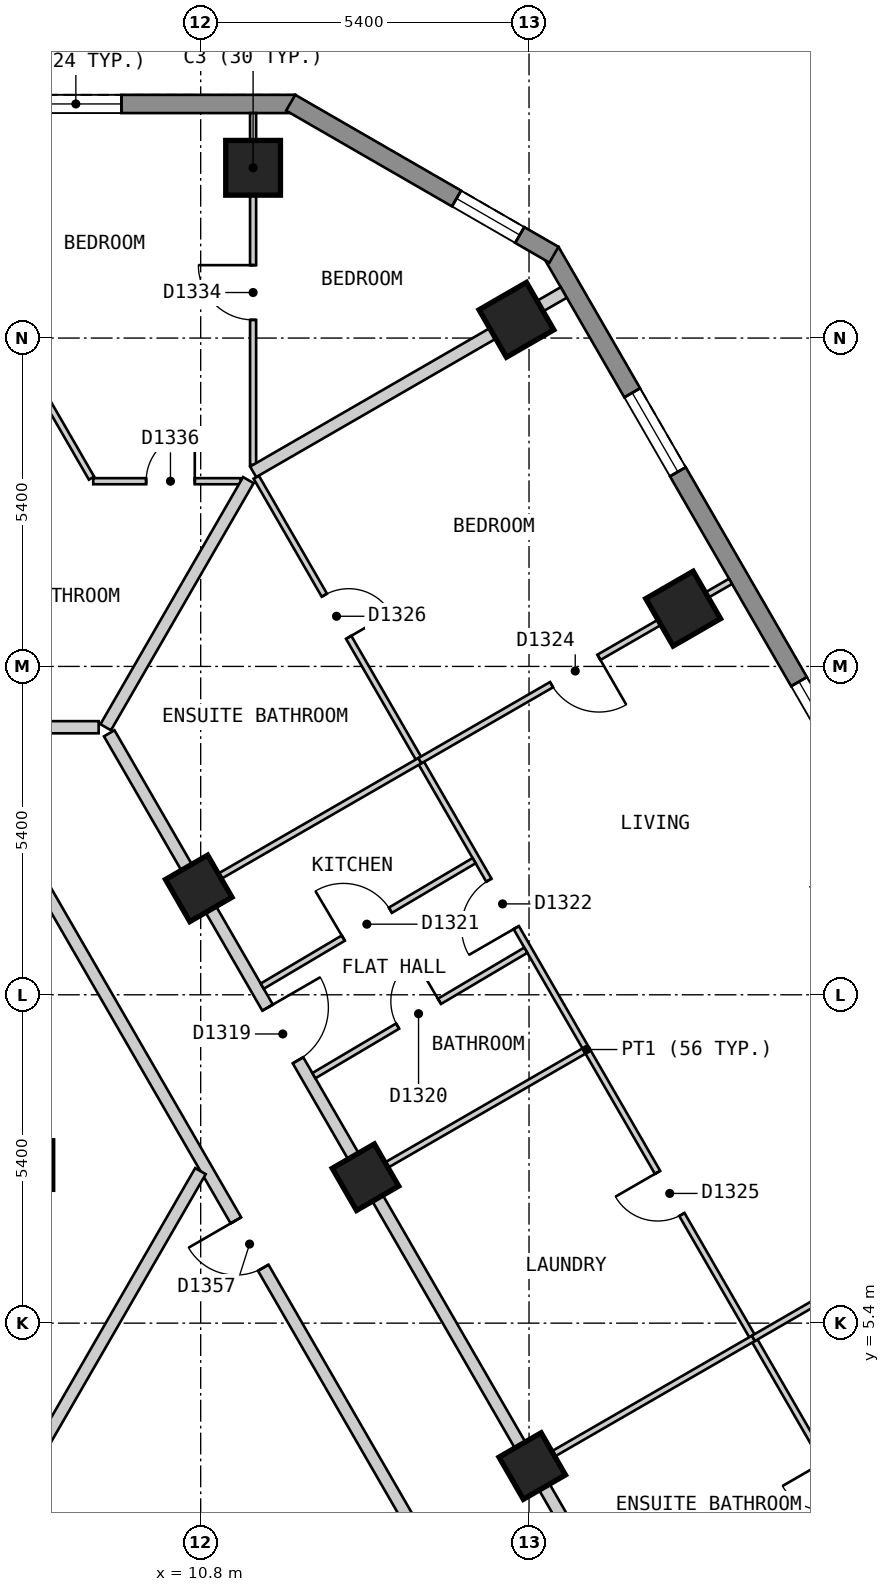
"""IFC4 building model, lengths in metres.
Left out: names, types, materials, properties, quantities, classifications, styles, units other than length and angle.
Written with IfcOpenShell. Run it as: python <this file> out.ifc"""

import sys

from ifc_helpers import new_model, si_unit, direction, frame, frame_2d, origin, origin_2d, place, context, subcontext, project, spatial, polyline, rectangle, outline, extrude, element, fill, save


model = new_model("IFC4")
c1 = context("Model", 3, precision=1e-05, world=origin(), true_north=direction((0.0, 1.0)))
c2 = subcontext(c1, "Body", "Model", "MODEL_VIEW")
j1 = project(units=[si_unit("LENGTHUNIT", "METRE"), si_unit("PLANEANGLEUNIT", "RADIAN")], contexts=[c1])
p1 = place(None, origin())
s1 = spatial("IfcSite", under=j1, at=p1, CompositionType="ELEMENT")
p2 = place(p1, origin())
s2 = spatial("IfcBuilding", under=s1, at=p2, CompositionType="ELEMENT")
p3 = place(p2, frame((0.0, 0.0, 135.6)))
s3 = spatial("IfcBuildingStorey", under=s2, at=p3, CompositionType="ELEMENT", Elevation=135.6)
for number, where, z_axis, x_axis in (
    (1, (11.662, 24.4, 0.0), (0.0, 0.0, 1.0), (-1.0, 0.0, 0.0)),
    (2, (18.735, 17.15, 0.0), (0.0, 0.0, 1.0), (-0.5, 0.866, 0.0)),
    (3, (15.993, 21.9, 0.0), (0.0, 0.0, 1.0), (-0.5, 0.866, 0.0)),
):
    element("IfcColumn", number, at=place(p3, frame(where, z_axis=z_axis, x_axis=x_axis)), inside=s3, PredefinedType="COLUMN", context=c2, shape_type="SweptSolid", body=[
        extrude(rectangle(XDim=0.9, YDim=0.9, at=origin_2d()), origin(), (0.0, 0.0, 1.0), 3.0),
    ])
for number, where, z_axis, x_axis in (
    (4, (16.253, 3.05, 0.0), (0.0, 0.0, 1.0), (-0.5, 0.866, 0.0)),
    (5, (13.51, 7.8, 0.0), (0.0, 0.0, 1.0), (-0.5, 0.866, 0.0)),
    (6, (7.967, 8.0, 0.0), (0.0, 0.0, 1.0), (1.0, 0.0, 0.0)),
    (7, (10.768, 12.55, 0.0), (0.0, 0.0, 1.0), (-0.5, 0.866, 0.0)),
):
    element("IfcColumn", number, at=place(p3, frame(where, z_axis=z_axis, x_axis=x_axis)), inside=s3, PredefinedType="COLUMN", context=c2, shape_type="SweptSolid", body=[
        extrude(rectangle(XDim=0.8, YDim=0.8, at=origin_2d()), origin(), (0.0, 0.0, 1.0), 3.0),
    ])
p4 = place(p3, frame((12.355, 25.45, 0.0), z_axis=(0.0, 0.0, 1.0), x_axis=(-1.0, 0.0, 0.0)))
e8 = element("IfcWall", 8, at=p4, inside=s3, PredefinedType="SOLIDWALL", context=c2, shape_type="SweptSolid", body=[
    extrude(outline(polyline([(0.0, -0.15), (24.71, -0.15), (24.63, 0.15), (0.08, 0.15), (0.0, -0.15)])), origin(), (0.0, 0.0, 1.0), 2.7),
])
p5 = place(p4, frame((2.858, 0.0, 0.15)))
e9 = element("IfcOpeningElement", 9, at=p5, cuts=e8, PredefinedType="OPENING", context=c2, shape_type="SweptSolid", body=[
    extrude(rectangle(XDim=1.5, YDim=2.1, at=frame_2d((0.75, 1.05))), frame((0.0, 0.16, 0.0), z_axis=(0.0, -1.0, 0.0), x_axis=(1.0, 0.0, 0.0)), (0.0, 0.0, 1.0), 0.32),
])
p6 = place(p4, frame((8.689, 0.0, 0.15)))
e10 = element("IfcOpeningElement", 10, at=p6, cuts=e8, PredefinedType="OPENING", context=c2, shape_type="SweptSolid", body=[
    extrude(rectangle(XDim=1.5, YDim=2.1, at=frame_2d((0.75, 1.05))), frame((0.0, 0.16, 0.0), z_axis=(0.0, -1.0, 0.0), x_axis=(1.0, 0.0, 0.0)), (0.0, 0.0, 1.0), 0.32),
])
p7 = place(p4, frame((14.521, 0.0, 0.15)))
e11 = element("IfcOpeningElement", 11, at=p7, cuts=e8, PredefinedType="OPENING", context=c2, shape_type="SweptSolid", body=[
    extrude(rectangle(XDim=1.5, YDim=2.1, at=frame_2d((0.75, 1.05))), frame((0.0, 0.16, 0.0), z_axis=(0.0, -1.0, 0.0), x_axis=(1.0, 0.0, 0.0)), (0.0, 0.0, 1.0), 0.32),
])
p8 = place(p4, frame((20.352, 0.0, 0.15)))
e12 = element("IfcOpeningElement", 12, at=p8, cuts=e8, PredefinedType="OPENING", context=c2, shape_type="SweptSolid", body=[
    extrude(rectangle(XDim=1.5, YDim=2.1, at=frame_2d((0.75, 1.05))), frame((0.0, 0.16, 0.0), z_axis=(0.0, -1.0, 0.0), x_axis=(1.0, 0.0, 0.0)), (0.0, 0.0, 1.0), 0.32),
])
p9 = place(p3, frame((28.218, 2.825, 0.0), z_axis=(0.0, 0.0, 1.0), x_axis=(-0.500020536353, 0.866013546791, 0.0)))
e13 = element("IfcWall", 13, at=p9, inside=s3, PredefinedType="SOLIDWALL", context=c2, shape_type="SweptSolid", body=[
    extrude(outline(polyline([(0.0, -0.15), (23.325, -0.15), (23.245, 0.15), (0.08, 0.15), (0.0, -0.15)])), origin(), (0.0, 0.0, 1.0), 2.7),
])
p10 = place(p9, frame((2.685, 0.0, 0.15)))
e14 = element("IfcOpeningElement", 14, at=p10, cuts=e13, PredefinedType="OPENING", context=c2, shape_type="SweptSolid", body=[
    extrude(rectangle(XDim=1.5, YDim=2.1, at=frame_2d((0.75, 1.05))), frame((0.0, 0.16, 0.0), z_axis=(0.0, -1.0, 0.0), x_axis=(1.0, 0.0, 0.0)), (0.0, 0.0, 1.0), 0.32),
])
p11 = place(p9, frame((8.17, 0.0, 0.15)))
e15 = element("IfcOpeningElement", 15, at=p11, cuts=e13, PredefinedType="OPENING", context=c2, shape_type="SweptSolid", body=[
    extrude(rectangle(XDim=1.5, YDim=2.1, at=frame_2d((0.75, 1.05))), frame((0.0, 0.16, 0.0), z_axis=(0.0, -1.0, 0.0), x_axis=(1.0, 0.0, 0.0)), (0.0, 0.0, 1.0), 0.32),
])
p12 = place(p9, frame((13.655, 0.0, 0.15)))
e16 = element("IfcOpeningElement", 16, at=p12, cuts=e13, PredefinedType="OPENING", context=c2, shape_type="SweptSolid", body=[
    extrude(rectangle(XDim=1.5, YDim=2.1, at=frame_2d((0.75, 1.05))), frame((0.0, 0.16, 0.0), z_axis=(0.0, -1.0, 0.0), x_axis=(1.0, 0.0, 0.0)), (0.0, 0.0, 1.0), 0.32),
])
p13 = place(p9, frame((19.14, 0.0, 0.15)))
e17 = element("IfcOpeningElement", 17, at=p13, cuts=e13, PredefinedType="OPENING", context=c2, shape_type="SweptSolid", body=[
    extrude(rectangle(XDim=1.5, YDim=2.1, at=frame_2d((0.75, 1.05))), frame((0.0, 0.16, 0.0), z_axis=(0.0, -1.0, 0.0), x_axis=(1.0, 0.0, 0.0)), (0.0, 0.0, 1.0), 0.32),
])
p14 = place(p3, frame((16.61, 22.97, 0.0), z_axis=(0.0, 0.0, 1.0), x_axis=(-0.866022959057, 0.500004234368, 0.0)))
e18 = element("IfcWall", 18, at=p14, inside=s3, PredefinedType="SOLIDWALL", context=c2, shape_type="SweptSolid", body=[
    extrude(outline(polyline([(0.0, -0.15), (5.0, -0.15), (4.92, 0.15), (0.08, 0.15), (0.0, -0.15)])), origin(), (0.0, 0.0, 1.0), 2.7),
])
p15 = place(p14, frame((0.65, 0.0, 0.15)))
e19 = element("IfcOpeningElement", 19, at=p15, cuts=e18, PredefinedType="OPENING", context=c2, shape_type="SweptSolid", body=[
    extrude(rectangle(XDim=1.2, YDim=2.1, at=frame_2d((0.6, 1.05))), frame((0.0, 0.16, 0.0), z_axis=(0.0, -1.0, 0.0), x_axis=(1.0, 0.0, 0.0)), (0.0, 0.0, 1.0), 0.32),
])
p16 = place(p3, frame((7.967, 13.0, 0.0), z_axis=(0.0, 0.0, 1.0), x_axis=(0.50003774998, -0.866003607726, 0.0)))
e20 = element("IfcWall", 20, at=p16, inside=s3, PredefinedType="PARTITIONING", context=c2, shape_type="SweptSolid", body=[
    extrude(rectangle(XDim=14.433, YDim=0.2, at=frame_2d((7.217, 0.0))), origin(), (0.0, 0.0, 1.0), 2.7),
])
p17 = place(p16, frame((6.824, 0.0, 0.0)))
e21 = element("IfcOpeningElement", 21, at=p17, cuts=e20, PredefinedType="OPENING", context=c2, shape_type="SweptSolid", body=[
    extrude(rectangle(XDim=0.9, YDim=2.1, at=frame_2d((0.45, 1.05))), frame((0.0, 0.11, 0.0), z_axis=(0.0, -1.0, 0.0), x_axis=(1.0, 0.0, 0.0)), (0.0, 0.0, 1.0), 0.22),
])
p18 = place(p3, frame((9.296, 15.1, 0.0), z_axis=(0.0, 0.0, 1.0), x_axis=(0.499974024244, -0.866040400375, 0.0)))
e22 = element("IfcWall", 22, at=p18, inside=s3, PredefinedType="PARTITIONING", context=c2, shape_type="SweptSolid", body=[
    extrude(rectangle(XDim=16.857, YDim=0.2, at=frame_2d((8.429, 0.0))), origin(), (0.0, 0.0, 1.0), 2.7),
])
p19 = place(p18, frame((5.209, 0.0, 0.0)))
e23 = element("IfcOpeningElement", 23, at=p19, cuts=e22, PredefinedType="OPENING", context=c2, shape_type="SweptSolid", body=[
    extrude(rectangle(XDim=1.0, YDim=2.1, at=frame_2d((0.5, 1.05))), frame((0.0, 0.11, 0.0), z_axis=(0.0, -1.0, 0.0), x_axis=(1.0, 0.0, 0.0)), (0.0, 0.0, 1.0), 0.22),
])
p20 = place(p3, frame((6.697, 15.2, 0.0), z_axis=(0.0, 0.0, 1.0), x_axis=(1.0, 0.0, 0.0)))
e24 = element("IfcWall", 24, at=p20, inside=s3, PredefinedType="PARTITIONING", context=c2, shape_type="SweptSolid", body=[
    extrude(rectangle(XDim=2.425, YDim=0.2, at=frame_2d((1.212, 0.0))), origin(), (0.0, 0.0, 1.0), 2.7),
])
p21 = place(p3, frame((7.028, 1.373, 0.0), z_axis=(0.0, 0.0, 1.0), x_axis=(0.499954271211, 0.866051803703, 0.0)))
e25 = element("IfcWall", 25, at=p21, inside=s3, PredefinedType="PARTITIONING", context=c2, shape_type="SweptSolid", body=[
    extrude(rectangle(XDim=7.536, YDim=0.2, at=frame_2d((3.768, 0.0))), origin(), (0.0, 0.0, 1.0), 2.7),
])
p22 = place(p3, frame((7.792, 21.396, 0.0), z_axis=(0.0, 0.0, 1.0), x_axis=(0.50012328804, -0.865954211699, 0.0)))
e26 = element("IfcWall", 26, at=p22, inside=s3, PredefinedType="PARTITIONING", context=c2, shape_type="SweptSolid", body=[
    extrude(rectangle(XDim=2.425, YDim=0.1, at=frame_2d((1.213, 0.0))), origin(), (0.0, 0.0, 1.0), 2.7),
])
p23 = place(p3, frame((11.713, 19.313, 0.0), z_axis=(0.0, 0.0, 1.0), x_axis=(0.499999523185, -0.866025679073, 0.0)))
e27 = element("IfcWall", 27, at=p23, inside=s3, PredefinedType="PARTITIONING", context=c2, shape_type="SweptSolid", body=[
    extrude(rectangle(XDim=21.738, YDim=0.1, at=frame_2d((10.869, 0.0))), origin(), (0.0, 0.0, 1.0), 2.7),
])
p24 = place(p23, frame((7.654, 0.0, 0.0)))
e28 = element("IfcOpeningElement", 28, at=p24, cuts=e27, PredefinedType="OPENING", context=c2, shape_type="SweptSolid", body=[
    extrude(rectangle(XDim=0.9, YDim=2.1, at=frame_2d((0.45, 1.05))), frame((0.0, 0.06, 0.0), z_axis=(0.0, -1.0, 0.0), x_axis=(1.0, 0.0, 0.0)), (0.0, 0.0, 1.0), 0.12),
])
p25 = place(p23, frame((13.202, 0.0, 0.0)))
e29 = element("IfcOpeningElement", 29, at=p25, cuts=e27, PredefinedType="OPENING", context=c2, shape_type="SweptSolid", body=[
    extrude(rectangle(XDim=0.8, YDim=2.1, at=frame_2d((0.4, 1.05))), frame((0.0, 0.06, 0.0), z_axis=(0.0, -1.0, 0.0), x_axis=(1.0, 0.0, 0.0)), (0.0, 0.0, 1.0), 0.12),
])
p26 = place(p23, frame((2.242, 0.0, 0.0)))
e30 = element("IfcOpeningElement", 30, at=p26, cuts=e27, PredefinedType="OPENING", context=c2, shape_type="SweptSolid", body=[
    extrude(rectangle(XDim=0.8, YDim=2.1, at=frame_2d((0.4, 1.05))), frame((0.0, 0.06, 0.0), z_axis=(0.0, -1.0, 0.0), x_axis=(1.0, 0.0, 0.0)), (0.0, 0.0, 1.0), 0.12),
])
p27 = place(p23, frame((18.696, 0.0, 0.0)))
e31 = element("IfcOpeningElement", 31, at=p27, cuts=e27, PredefinedType="OPENING", context=c2, shape_type="SweptSolid", body=[
    extrude(rectangle(XDim=0.8, YDim=2.1, at=frame_2d((0.4, 1.05))), frame((0.0, 0.06, 0.0), z_axis=(0.0, -1.0, 0.0), x_axis=(1.0, 0.0, 0.0)), (0.0, 0.0, 1.0), 0.12),
])
p28 = place(p3, frame((9.033, 19.246, 0.0), z_axis=(0.0, 0.0, 1.0), x_axis=(1.0, 0.0, 0.0)))
e32 = element("IfcWall", 32, at=p28, inside=s3, PredefinedType="PARTITIONING", context=c2, shape_type="SweptSolid", body=[
    extrude(rectangle(XDim=2.425, YDim=0.1, at=frame_2d((1.212, 0.0))), origin(), (0.0, 0.0, 1.0), 2.7),
])
p29 = place(p28, frame((0.87, 0.0, 0.0)))
e33 = element("IfcOpeningElement", 33, at=p29, cuts=e32, PredefinedType="OPENING", context=c2, shape_type="SweptSolid", body=[
    extrude(rectangle(XDim=0.8, YDim=2.1, at=frame_2d((0.4, 1.05))), frame((0.0, 0.06, 0.0), z_axis=(0.0, -1.0, 0.0), x_axis=(1.0, 0.0, 0.0)), (0.0, 0.0, 1.0), 0.12),
])
p30 = place(p3, frame((11.662, 19.514, 0.0), z_axis=(0.0, 0.0, 1.0), x_axis=(0.0, 1.0, 0.0)))
e34 = element("IfcWall", 34, at=p30, inside=s3, PredefinedType="PARTITIONING", context=c2, shape_type="SweptSolid", body=[
    extrude(rectangle(XDim=5.786, YDim=0.1, at=frame_2d((2.893, 0.0))), origin(), (0.0, 0.0, 1.0), 2.7),
])
p31 = place(p30, frame((2.385, 0.0, 0.0)))
e35 = element("IfcOpeningElement", 35, at=p31, cuts=e34, PredefinedType="OPENING", context=c2, shape_type="SweptSolid", body=[
    extrude(rectangle(XDim=0.9, YDim=2.1, at=frame_2d((0.45, 1.05))), frame((0.0, 0.06, 0.0), z_axis=(0.0, -1.0, 0.0), x_axis=(1.0, 0.0, 0.0)), (0.0, 0.0, 1.0), 0.12),
])
p32 = place(p3, frame((16.339, 3.1, 0.0), z_axis=(0.0, 0.0, 1.0), x_axis=(0.866050731258, 0.499956128963, 0.0)))
e36 = element("IfcWall", 36, at=p32, inside=s3, PredefinedType="PARTITIONING", context=c2, shape_type="SweptSolid", body=[
    extrude(rectangle(XDim=4.1, YDim=0.1, at=frame_2d((2.05, 0.0))), origin(), (0.0, 0.0, 1.0), 2.7),
])
p33 = place(p3, frame((13.597, 7.85, 0.0), z_axis=(0.0, 0.0, 1.0), x_axis=(0.866015917575, 0.500016430238, 0.0)))
e37 = element("IfcWall", 37, at=p33, inside=s3, PredefinedType="PARTITIONING", context=c2, shape_type="SweptSolid", body=[
    extrude(rectangle(XDim=4.05, YDim=0.1, at=frame_2d((2.025, 0.0))), origin(), (0.0, 0.0, 1.0), 2.7),
])
p34 = place(p3, frame((10.854, 12.6, 0.0), z_axis=(0.0, 0.0, 1.0), x_axis=(0.86606561423, 0.499930346997, 0.0)))
e38 = element("IfcWall", 38, at=p34, inside=s3, PredefinedType="PARTITIONING", context=c2, shape_type="SweptSolid", body=[
    extrude(rectangle(XDim=4.1, YDim=0.1, at=frame_2d((2.05, 0.0))), origin(), (0.0, 0.0, 1.0), 2.7),
])
p35 = place(p3, frame((11.812, 10.942, 0.0), z_axis=(0.0, 0.0, 1.0), x_axis=(0.860404104761, 0.509612378687, 0.0)))
e39 = element("IfcWall", 39, at=p35, inside=s3, PredefinedType="PARTITIONING", context=c2, shape_type="SweptSolid", body=[
    extrude(rectangle(XDim=4.051, YDim=0.1, at=frame_2d((2.025, 0.0))), origin(), (0.0, 0.0, 1.0), 2.7),
])
p36 = place(p35, frame((1.55, 0.0, 0.0)))
e40 = element("IfcOpeningElement", 40, at=p36, cuts=e39, PredefinedType="OPENING", context=c2, shape_type="SweptSolid", body=[
    extrude(rectangle(XDim=0.9, YDim=2.1, at=frame_2d((0.45, 1.05))), frame((0.0, 0.06, 0.0), z_axis=(0.0, -1.0, 0.0), x_axis=(1.0, 0.0, 0.0)), (0.0, 0.0, 1.0), 0.12),
])
p37 = place(p3, frame((12.662, 9.47, 0.0), z_axis=(0.0, 0.0, 1.0), x_axis=(0.860520594262, 0.509415652341, 0.0)))
e41 = element("IfcWall", 41, at=p37, inside=s3, PredefinedType="PARTITIONING", context=c2, shape_type="SweptSolid", body=[
    extrude(rectangle(XDim=4.05, YDim=0.1, at=frame_2d((2.025, 0.0))), origin(), (0.0, 0.0, 1.0), 2.7),
])
p38 = place(p37, frame((1.6, 0.0, 0.0)))
e42 = element("IfcOpeningElement", 42, at=p38, cuts=e41, PredefinedType="OPENING", context=c2, shape_type="SweptSolid", body=[
    extrude(rectangle(XDim=0.8, YDim=2.1, at=frame_2d((0.4, 1.05))), frame((0.0, 0.06, 0.0), z_axis=(0.0, -1.0, 0.0), x_axis=(1.0, 0.0, 0.0)), (0.0, 0.0, 1.0), 0.12),
])
p39 = place(p3, frame((9.238, 15.2, 0.0), z_axis=(0.0, 0.0, 1.0), x_axis=(0.49993863487, 0.86606083006, 0.0)))
e43 = element("IfcWall", 43, at=p39, inside=s3, PredefinedType="PARTITIONING", context=c2, shape_type="SweptSolid", body=[
    extrude(rectangle(XDim=4.692, YDim=0.2, at=frame_2d((2.346, 0.0))), origin(), (0.0, 0.0, 1.0), 2.7),
])
p40 = place(p3, frame((11.663, 19.4, 0.0), z_axis=(0.0, 0.0, 1.0), x_axis=(0.865941558533, 0.500145196124, 0.0)))
e44 = element("IfcWall", 44, at=p40, inside=s3, PredefinedType="PARTITIONING", context=c2, shape_type="SweptSolid", body=[
    extrude(rectangle(XDim=5.899, YDim=0.2, at=frame_2d((2.949, 0.0))), origin(), (0.0, 0.0, 1.0), 2.7),
])
p41 = place(p3, frame((19.89, 5.15, 0.0), z_axis=(0.0, 0.0, 1.0), x_axis=(0.865993310977, 0.500055582255, 0.0)))
e45 = element("IfcWall", 45, at=p41, inside=s3, PredefinedType="PARTITIONING", context=c2, shape_type="SweptSolid", body=[
    extrude(rectangle(XDim=5.9, YDim=0.1, at=frame_2d((2.95, 0.0))), origin(), (0.0, 0.0, 1.0), 2.7),
])
p42 = place(p41, frame((2.5, 0.0, 0.0)))
e46 = element("IfcOpeningElement", 46, at=p42, cuts=e45, PredefinedType="OPENING", context=c2, shape_type="SweptSolid", body=[
    extrude(rectangle(XDim=0.9, YDim=2.1, at=frame_2d((0.45, 1.05))), frame((0.0, 0.06, 0.0), z_axis=(0.0, -1.0, 0.0), x_axis=(1.0, 0.0, 0.0)), (0.0, 0.0, 1.0), 0.12),
])
p43 = place(p3, frame((14.405, 14.65, 0.0), z_axis=(0.0, 0.0, 1.0), x_axis=(0.866054644421, 0.499949350311, 0.0)))
e47 = element("IfcWall", 47, at=p43, inside=s3, PredefinedType="PARTITIONING", context=c2, shape_type="SweptSolid", body=[
    extrude(rectangle(XDim=5.899, YDim=0.1, at=frame_2d((2.949, 0.0))), origin(), (0.0, 0.0, 1.0), 2.7),
])
p44 = place(p43, frame((2.5, 0.0, 0.0)))
e48 = element("IfcOpeningElement", 48, at=p44, cuts=e47, PredefinedType="OPENING", context=c2, shape_type="SweptSolid", body=[
    extrude(rectangle(XDim=0.9, YDim=2.1, at=frame_2d((0.45, 1.05))), frame((0.0, 0.06, 0.0), z_axis=(0.0, -1.0, 0.0), x_axis=(1.0, 0.0, 0.0)), (0.0, 0.0, 1.0), 0.12),
])
p45 = place(p5, origin())
e49 = element("IfcWindow", 49, at=p45, inside=s3, PartitioningType="SINGLE_PANEL", PredefinedType="WINDOW", context=c2, shape_type="SweptSolid", body=[
    extrude(rectangle(XDim=1.5, YDim=2.1, at=frame_2d((0.75, 1.05))), frame((0.0, 0.03, 0.0), z_axis=(0.0, -1.0, 0.0), x_axis=(1.0, 0.0, 0.0)), (0.0, 0.0, 1.0), 0.06),
])
fill(e9, e49)
p46 = place(p12, origin())
e50 = element("IfcWindow", 50, at=p46, inside=s3, PartitioningType="SINGLE_PANEL", PredefinedType="WINDOW", context=c2, shape_type="SweptSolid", body=[
    extrude(rectangle(XDim=1.5, YDim=2.1, at=frame_2d((0.75, 1.05))), frame((0.0, 0.03, 0.0), z_axis=(0.0, -1.0, 0.0), x_axis=(1.0, 0.0, 0.0)), (0.0, 0.0, 1.0), 0.06),
])
fill(e16, e50)
p47 = place(p13, origin())
e51 = element("IfcWindow", 51, at=p47, inside=s3, PartitioningType="SINGLE_PANEL", PredefinedType="WINDOW", context=c2, shape_type="SweptSolid", body=[
    extrude(rectangle(XDim=1.5, YDim=2.1, at=frame_2d((0.75, 1.05))), frame((0.0, 0.03, 0.0), z_axis=(0.0, -1.0, 0.0), x_axis=(1.0, 0.0, 0.0)), (0.0, 0.0, 1.0), 0.06),
])
fill(e17, e51)
p48 = place(p15, origin())
e52 = element("IfcWindow", 52, at=p48, inside=s3, PartitioningType="SINGLE_PANEL", PredefinedType="WINDOW", context=c2, shape_type="SweptSolid", body=[
    extrude(rectangle(XDim=1.2, YDim=2.1, at=frame_2d((0.6, 1.05))), frame((0.0, 0.03, 0.0), z_axis=(0.0, -1.0, 0.0), x_axis=(1.0, 0.0, 0.0)), (0.0, 0.0, 1.0), 0.06),
])
fill(e19, e52)
p49 = place(p19, origin())
e53 = element("IfcDoor", 53, at=p49, inside=s3, OperationType="SINGLE_SWING_LEFT", PredefinedType="DOOR", context=c2, shape_type="SweptSolid", body=[
    extrude(rectangle(XDim=1.0, YDim=2.1, at=frame_2d((0.5, 1.05))), frame((0.0, 0.025, 0.0), z_axis=(0.0, -1.0, 0.0), x_axis=(1.0, 0.0, 0.0)), (0.0, 0.0, 1.0), 0.05),
])
fill(e23, e53)
p50 = place(p38, origin())
e54 = element("IfcDoor", 54, at=p50, inside=s3, OperationType="SINGLE_SWING_RIGHT", PredefinedType="DOOR", context=c2, shape_type="SweptSolid", body=[
    extrude(rectangle(XDim=0.8, YDim=2.1, at=frame_2d((0.4, 1.05))), frame((0.0, 0.025, 0.0), z_axis=(0.0, -1.0, 0.0), x_axis=(1.0, 0.0, 0.0)), (0.0, 0.0, 1.0), 0.05),
])
fill(e42, e54)
p51 = place(p36, origin())
e55 = element("IfcDoor", 55, at=p51, inside=s3, OperationType="SINGLE_SWING_LEFT", PredefinedType="DOOR", context=c2, shape_type="SweptSolid", body=[
    extrude(rectangle(XDim=0.9, YDim=2.1, at=frame_2d((0.45, 1.05))), frame((0.0, 0.025, 0.0), z_axis=(0.0, -1.0, 0.0), x_axis=(1.0, 0.0, 0.0)), (0.0, 0.0, 1.0), 0.05),
])
fill(e40, e55)
p52 = place(p24, origin())
e56 = element("IfcDoor", 56, at=p52, inside=s3, OperationType="SINGLE_SWING_RIGHT", PredefinedType="DOOR", context=c2, shape_type="SweptSolid", body=[
    extrude(rectangle(XDim=0.9, YDim=2.1, at=frame_2d((0.45, 1.05))), frame((0.0, 0.025, 0.0), z_axis=(0.0, -1.0, 0.0), x_axis=(1.0, 0.0, 0.0)), (0.0, 0.0, 1.0), 0.05),
])
fill(e28, e56)
p53 = place(p44, origin())
e57 = element("IfcDoor", 57, at=p53, inside=s3, OperationType="SINGLE_SWING_RIGHT", PredefinedType="DOOR", context=c2, shape_type="SweptSolid", body=[
    extrude(rectangle(XDim=0.9, YDim=2.1, at=frame_2d((0.45, 1.05))), frame((0.0, 0.025, 0.0), z_axis=(0.0, -1.0, 0.0), x_axis=(1.0, 0.0, 0.0)), (0.0, 0.0, 1.0), 0.05),
])
fill(e48, e57)
p54 = place(p25, origin())
e58 = element("IfcDoor", 58, at=p54, inside=s3, OperationType="SINGLE_SWING_LEFT", PredefinedType="DOOR", context=c2, shape_type="SweptSolid", body=[
    extrude(rectangle(XDim=0.8, YDim=2.1, at=frame_2d((0.4, 1.05))), frame((0.0, 0.025, 0.0), z_axis=(0.0, -1.0, 0.0), x_axis=(1.0, 0.0, 0.0)), (0.0, 0.0, 1.0), 0.05),
])
fill(e29, e58)
p55 = place(p26, origin())
e59 = element("IfcDoor", 59, at=p55, inside=s3, OperationType="SINGLE_SWING_RIGHT", PredefinedType="DOOR", context=c2, shape_type="SweptSolid", body=[
    extrude(rectangle(XDim=0.8, YDim=2.1, at=frame_2d((0.4, 1.05))), frame((0.0, 0.025, 0.0), z_axis=(0.0, -1.0, 0.0), x_axis=(1.0, 0.0, 0.0)), (0.0, 0.0, 1.0), 0.05),
])
fill(e30, e59)
p56 = place(p31, origin())
e60 = element("IfcDoor", 60, at=p56, inside=s3, OperationType="SINGLE_SWING_RIGHT", PredefinedType="DOOR", context=c2, shape_type="SweptSolid", body=[
    extrude(rectangle(XDim=0.9, YDim=2.1, at=frame_2d((0.45, 1.05))), frame((0.0, 0.025, 0.0), z_axis=(0.0, -1.0, 0.0), x_axis=(1.0, 0.0, 0.0)), (0.0, 0.0, 1.0), 0.05),
])
fill(e35, e60)
p57 = place(p29, origin())
e61 = element("IfcDoor", 61, at=p57, inside=s3, OperationType="SINGLE_SWING_RIGHT", PredefinedType="DOOR", context=c2, shape_type="SweptSolid", body=[
    extrude(rectangle(XDim=0.8, YDim=2.1, at=frame_2d((0.4, 1.05))), frame((0.0, 0.025, 0.0), z_axis=(0.0, -1.0, 0.0), x_axis=(1.0, 0.0, 0.0)), (0.0, 0.0, 1.0), 0.05),
])
fill(e33, e61)
p58 = place(p17, origin())
e62 = element("IfcDoor", 62, at=p58, inside=s3, OperationType="SINGLE_SWING_LEFT", PredefinedType="DOOR", context=c2, shape_type="SweptSolid", body=[
    extrude(rectangle(XDim=0.9, YDim=2.1, at=frame_2d((0.45, 1.05))), frame((0.0, 0.025, 0.0), z_axis=(0.0, -1.0, 0.0), x_axis=(1.0, 0.0, 0.0)), (0.0, 0.0, 1.0), 0.05),
])
fill(e21, e62)
save(model, sys.argv[1])
